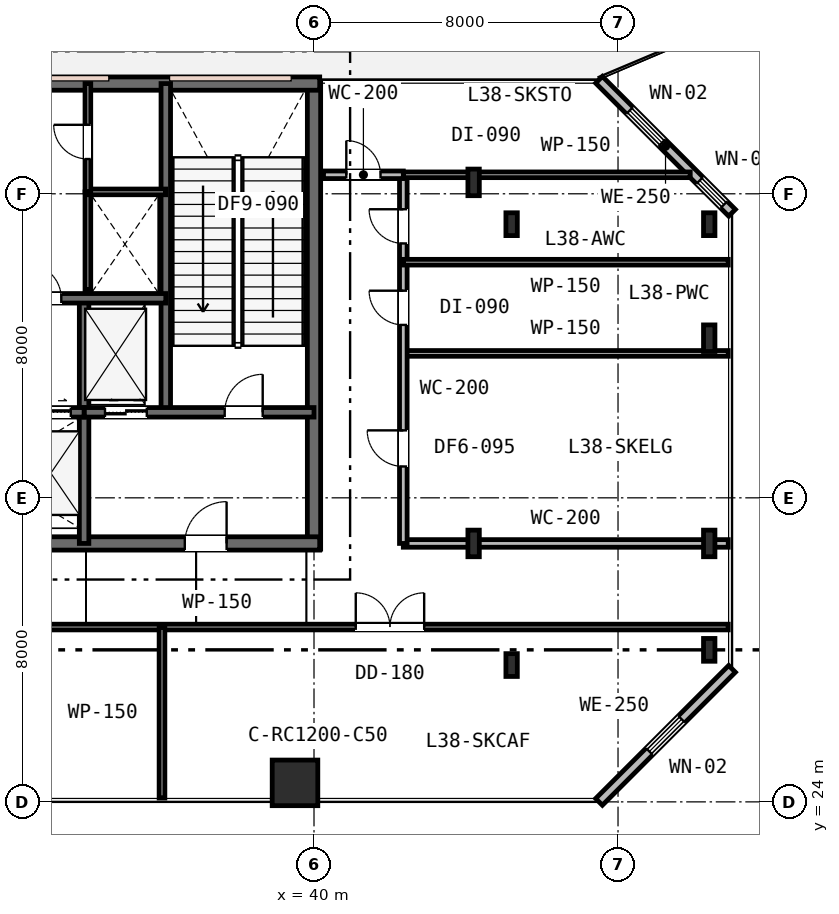
"""IFC4 building model, lengths in metres.
Left out: names, types, materials, properties, quantities, classifications, styles, units other than length and angle.
Written with IfcOpenShell. Run it as: python <this file> out.ifc"""

import sys

from ifc_helpers import new_model, si_unit, direction, frame, frame_2d, origin, origin_2d, place, context, subcontext, project, spatial, rectangle, i_section, extrude, element, fill, save


model = new_model("IFC4")
c1 = context("Model", 3, precision=1e-05, world=origin(), true_north=direction((0.0, 1.0)))
c2 = subcontext(c1, "Body", "Model", "MODEL_VIEW")
j1 = project(units=[si_unit("LENGTHUNIT", "METRE"), si_unit("PLANEANGLEUNIT", "RADIAN")], contexts=[c1])
p1 = place(None, origin())
s1 = spatial("IfcSite", under=j1, at=p1, CompositionType="ELEMENT")
p2 = place(p1, origin())
s2 = spatial("IfcBuilding", under=s1, at=p2, CompositionType="ELEMENT")
p3 = place(p2, frame((0.0, 0.0, 148.8)))
s3 = spatial("IfcBuildingStorey", under=s2, at=p3, CompositionType="ELEMENT", Elevation=148.8)
p4 = place(p3, frame((40.0, 30.65, 0.0), z_axis=(0.0, 0.0, 1.0), x_axis=(0.0, 1.0, 0.0)))
e1 = element("IfcWall", 1, at=p4, inside=s3, PredefinedType="SHEAR", context=c2, shape_type="SweptSolid", body=[
    extrude(rectangle(XDim=12.3, YDim=0.35, at=frame_2d((6.15, 0.0))), origin(), (0.0, 0.0, 1.0), 5.4),
])
p5 = place(p3, frame((15.85, 42.9, 0.0), z_axis=(0.0, 0.0, 1.0), x_axis=(1.0, 0.0, 0.0)))
e2 = element("IfcWall", 2, at=p5, inside=s3, PredefinedType="SHEAR", context=c2, shape_type="SweptSolid", body=[
    extrude(rectangle(XDim=24.3, YDim=0.35, at=frame_2d((12.15, 0.0))), origin(), (0.0, 0.0, 1.0), 5.4),
])
p6 = place(p3, frame((28.95, 30.8, 0.0), z_axis=(0.0, 0.0, 1.0), x_axis=(1.0, 0.0, 0.0)))
e3 = element("IfcWall", 3, at=p6, inside=s3, PredefinedType="SHEAR", context=c2, shape_type="SweptSolid", body=[
    extrude(rectangle(XDim=11.2, YDim=0.35, at=frame_2d((5.6, 0.0))), origin(), (0.0, 0.0, 1.0), 5.4),
])
p7 = place(p6, frame((7.65, 0.0, 0.0)))
e4 = element("IfcOpeningElement", 4, at=p7, cuts=e3, PredefinedType="OPENING", context=c2, shape_type="SweptSolid", body=[
    extrude(rectangle(XDim=1.1, YDim=2.15, at=frame_2d((0.55, 1.075))), frame((0.0, 0.185, 0.0), z_axis=(0.0, -1.0, 0.0), x_axis=(1.0, 0.0, 0.0)), (0.0, 0.0, 1.0), 0.37),
])
p8 = place(p3, frame((36.1, 34.25, 0.0), z_axis=(0.0, 0.0, 1.0), x_axis=(0.0, 1.0, 0.0)))
e5 = element("IfcWall", 5, at=p8, inside=s3, PredefinedType="SHEAR", context=c2, shape_type="SweptSolid", body=[
    extrude(rectangle(XDim=8.65, YDim=0.25, at=frame_2d((4.325, 0.0))), origin(), (0.0, 0.0, 1.0), 5.4),
])
p9 = place(p3, frame((33.95, 30.8, 0.0), z_axis=(0.0, 0.0, 1.0), x_axis=(0.0, 1.0, 0.0)))
e6 = element("IfcWall", 6, at=p9, inside=s3, PredefinedType="SHEAR", context=c2, shape_type="SweptSolid", body=[
    extrude(rectangle(XDim=6.45, YDim=0.25, at=frame_2d((3.225, 0.0))), origin(), (0.0, 0.0, 1.0), 5.4),
])
p10 = place(p3, frame((33.95, 34.25, 0.0), z_axis=(0.0, 0.0, 1.0), x_axis=(1.0, 0.0, 0.0)))
e7 = element("IfcWall", 7, at=p10, inside=s3, PredefinedType="SHEAR", context=c2, shape_type="SweptSolid", body=[
    extrude(rectangle(XDim=6.05, YDim=0.25, at=frame_2d((3.025, 0.0))), origin(), (0.0, 0.0, 1.0), 5.4),
])
p11 = place(p10, frame((3.7, 0.0, 0.0)))
e8 = element("IfcOpeningElement", 8, at=p11, cuts=e7, PredefinedType="OPENING", context=c2, shape_type="SweptSolid", body=[
    extrude(rectangle(XDim=1.0, YDim=2.15, at=frame_2d((0.5, 1.075))), frame((0.0, 0.135, 0.0), z_axis=(0.0, -1.0, 0.0), x_axis=(1.0, 0.0, 0.0)), (0.0, 0.0, 1.0), 0.27),
])
p12 = place(p10, frame((0.55, 0.0, 0.0)))
e9 = element("IfcOpeningElement", 9, at=p12, cuts=e7, PredefinedType="OPENING", context=c2, shape_type="SweptSolid", body=[
    extrude(rectangle(XDim=1.1, YDim=2.15, at=frame_2d((0.55, 1.075))), frame((0.0, 0.135, 0.0), z_axis=(0.0, -1.0, 0.0), x_axis=(1.0, 0.0, 0.0)), (0.0, 0.0, 1.0), 0.27),
])
p13 = place(p3, frame((28.95, 34.25, 0.0), z_axis=(0.0, 0.0, 1.0), x_axis=(1.0, 0.0, 0.0)))
e10 = element("IfcWall", 10, at=p13, inside=s3, PredefinedType="SHEAR", context=c2, shape_type="SweptSolid", body=[
    extrude(rectangle(XDim=5.0, YDim=0.25, at=frame_2d((2.5, 0.0))), origin(), (0.0, 0.0, 1.0), 5.4),
])
p14 = place(p13, frame((0.3, 0.0, 0.0)))
e11 = element("IfcOpeningElement", 11, at=p14, cuts=e10, PredefinedType="OPENING", context=c2, shape_type="SweptSolid", body=[
    extrude(rectangle(XDim=1.05, YDim=2.15, at=frame_2d((0.525, 1.075))), frame((0.0, 0.135, 0.0), z_axis=(0.0, -1.0, 0.0), x_axis=(1.0, 0.0, 0.0)), (0.0, 0.0, 1.0), 0.27),
])
p15 = place(p13, frame((1.95, 0.0, 0.0)))
e12 = element("IfcOpeningElement", 12, at=p15, cuts=e10, PredefinedType="OPENING", context=c2, shape_type="SweptSolid", body=[
    extrude(rectangle(XDim=1.05, YDim=2.15, at=frame_2d((0.525, 1.075))), frame((0.0, 0.135, 0.0), z_axis=(0.0, -1.0, 0.0), x_axis=(1.0, 0.0, 0.0)), (0.0, 0.0, 1.0), 0.27),
])
p16 = place(p13, frame((3.6, 0.0, 0.0)))
e13 = element("IfcOpeningElement", 13, at=p16, cuts=e10, PredefinedType="OPENING", context=c2, shape_type="SweptSolid", body=[
    extrude(rectangle(XDim=1.05, YDim=2.15, at=frame_2d((0.525, 1.075))), frame((0.0, 0.135, 0.0), z_axis=(0.0, -1.0, 0.0), x_axis=(1.0, 0.0, 0.0)), (0.0, 0.0, 1.0), 0.27),
])
p17 = place(p3, frame((19.9, 37.25, 0.0), z_axis=(0.0, 0.0, 1.0), x_axis=(1.0, 0.0, 0.0)))
e14 = element("IfcWall", 14, at=p17, inside=s3, PredefinedType="SHEAR", context=c2, shape_type="SweptSolid", body=[
    extrude(rectangle(XDim=16.2, YDim=0.25, at=frame_2d((8.1, 0.0))), origin(), (0.0, 0.0, 1.0), 5.4),
])
p18 = place(p17, frame((12.55, 0.0, 0.0)))
e15 = element("IfcOpeningElement", 15, at=p18, cuts=e14, PredefinedType="OPENING", context=c2, shape_type="SweptSolid", body=[
    extrude(rectangle(XDim=0.9, YDim=2.15, at=frame_2d((0.45, 1.075))), frame((0.0, 0.135, 0.0), z_axis=(0.0, -1.0, 0.0), x_axis=(1.0, 0.0, 0.0)), (0.0, 0.0, 1.0), 0.27),
])
p19 = place(p17, frame((2.5, 0.0, 0.0)))
e16 = element("IfcOpeningElement", 16, at=p19, cuts=e14, PredefinedType="OPENING", context=c2, shape_type="SweptSolid", body=[
    extrude(rectangle(XDim=1.05, YDim=2.15, at=frame_2d((0.525, 1.075))), frame((0.0, 0.135, 0.0), z_axis=(0.0, -1.0, 0.0), x_axis=(1.0, 0.0, 0.0)), (0.0, 0.0, 1.0), 0.27),
])
p20 = place(p17, frame((4.4, 0.0, 0.0)))
e17 = element("IfcOpeningElement", 17, at=p20, cuts=e14, PredefinedType="OPENING", context=c2, shape_type="SweptSolid", body=[
    extrude(rectangle(XDim=1.05, YDim=2.15, at=frame_2d((0.525, 1.075))), frame((0.0, 0.135, 0.0), z_axis=(0.0, -1.0, 0.0), x_axis=(1.0, 0.0, 0.0)), (0.0, 0.0, 1.0), 0.27),
])
p21 = place(p17, frame((6.3, 0.0, 0.0)))
e18 = element("IfcOpeningElement", 18, at=p21, cuts=e14, PredefinedType="OPENING", context=c2, shape_type="SweptSolid", body=[
    extrude(rectangle(XDim=1.05, YDim=2.15, at=frame_2d((0.525, 1.075))), frame((0.0, 0.135, 0.0), z_axis=(0.0, -1.0, 0.0), x_axis=(1.0, 0.0, 0.0)), (0.0, 0.0, 1.0), 0.27),
])
p22 = place(p3, frame((39.5, 24.5, 0.0), z_axis=(0.0, 0.0, 1.0), x_axis=(1.0, 0.0, 0.0)))
e19 = element("IfcColumn", 19, at=p22, inside=s3, PredefinedType="COLUMN", context=c2, shape_type="SweptSolid", body=[
    extrude(rectangle(XDim=1.2, YDim=1.2, at=origin_2d()), origin(), (0.0, 0.0, 1.0), 5.4),
])
for number, where, z_axis, x_axis in (
    (20, (45.2, 27.6, 0.0), (0.0, 0.0, 1.0), (1.0, 0.0, 0.0)),
    (21, (45.2, 39.2, 0.0), (0.0, 0.0, 1.0), (1.0, 0.0, 0.0)),
    (22, (50.4, 28.0, 0.0), (0.0, 0.0, 1.0), (1.0, 0.0, 0.0)),
    (23, (50.4, 39.2, 0.0), (0.0, 0.0, 1.0), (1.0, 0.0, 0.0)),
):
    element("IfcColumn", number, at=place(p3, frame(where, z_axis=z_axis, x_axis=x_axis)), inside=s3, PredefinedType="COLUMN", context=c2, shape_type="SweptSolid", body=[
        extrude(i_section(OverallWidth=0.3, OverallDepth=0.6, WebThickness=0.015, FlangeThickness=0.03, FilletRadius=0.027, at=origin_2d()), origin(), (0.0, 0.0, 1.0), 5.4),
    ])
for number, where, z_axis, x_axis in (
    (24, (44.2, 30.8, 0.0), (0.0, 0.0, 1.0), (1.0, 0.0, 0.0)),
    (25, (44.2, 40.3, 0.0), (0.0, 0.0, 1.0), (1.0, 0.0, 0.0)),
    (26, (50.4, 30.8, 0.0), (0.0, 0.0, 1.0), (1.0, 0.0, 0.0)),
    (27, (50.4, 36.2, 0.0), (0.0, 0.0, 1.0), (1.0, 0.0, 0.0)),
):
    element("IfcColumn", number, at=place(p3, frame(where, z_axis=z_axis, x_axis=x_axis)), inside=s3, PredefinedType="COLUMN", context=c2, shape_type="SweptSolid", body=[
        extrude(i_section(OverallWidth=0.3, OverallDepth=0.7, WebThickness=0.017, FlangeThickness=0.032, FilletRadius=0.027, at=origin_2d()), origin(), (0.0, 0.0, 1.0), 5.4),
    ])
p23 = place(p3, frame((47.5, 24.0, 0.0), z_axis=(0.0, 0.0, 1.0), x_axis=(0.707106781187, 0.707106781187, 0.0)))
e28 = element("IfcWall", 28, at=p23, inside=s3, PredefinedType="STANDARD", context=c2, shape_type="SweptSolid", body=[
    extrude(rectangle(XDim=4.95, YDim=0.25, at=frame_2d((2.475, 0.0))), origin(), (0.0, 0.0, 1.0), 5.13),
])
p24 = place(p23, frame((1.875, 0.0, 0.85)))
e29 = element("IfcOpeningElement", 29, at=p24, cuts=e28, PredefinedType="OPENING", context=c2, shape_type="SweptSolid", body=[
    extrude(rectangle(XDim=1.2, YDim=1.6, at=frame_2d((0.6, 0.8))), frame((0.0, 0.135, 0.0), z_axis=(0.0, -1.0, 0.0), x_axis=(1.0, 0.0, 0.0)), (0.0, 0.0, 1.0), 0.27),
])
p25 = place(p3, frame((51.0, 39.5, 0.0), z_axis=(0.0, 0.0, 1.0), x_axis=(-0.707106781187, 0.707106781187, 0.0)))
e30 = element("IfcWall", 30, at=p25, inside=s3, PredefinedType="STANDARD", context=c2, shape_type="SweptSolid", body=[
    extrude(rectangle(XDim=4.95, YDim=0.25, at=frame_2d((2.475, 0.0))), origin(), (0.0, 0.0, 1.0), 5.13),
])
p26 = place(p25, frame((0.302, 0.0, 0.9)))
e31 = element("IfcOpeningElement", 31, at=p26, cuts=e30, PredefinedType="OPENING", context=c2, shape_type="SweptSolid", body=[
    extrude(rectangle(XDim=0.9, YDim=1.55, at=frame_2d((0.45, 0.775))), frame((0.0, 0.135, 0.0), z_axis=(0.0, -1.0, 0.0), x_axis=(1.0, 0.0, 0.0)), (0.0, 0.0, 1.0), 0.27),
])
p27 = place(p25, frame((2.607, 0.0, 0.85)))
e32 = element("IfcOpeningElement", 32, at=p27, cuts=e30, PredefinedType="OPENING", context=c2, shape_type="SweptSolid", body=[
    extrude(rectangle(XDim=1.2, YDim=1.6, at=frame_2d((0.6, 0.8))), frame((0.0, 0.135, 0.0), z_axis=(0.0, -1.0, 0.0), x_axis=(1.0, 0.0, 0.0)), (0.0, 0.0, 1.0), 0.27),
])
p28 = place(p3, frame((34.05, 37.473, 0.0), z_axis=(0.0, 0.0, 1.0), x_axis=(0.0, 1.0, 0.0)))
e33 = element("IfcWall", 33, at=p28, inside=s3, PredefinedType="PLUMBINGWALL", context=c2, shape_type="SweptSolid", body=[
    extrude(rectangle(XDim=2.577, YDim=0.15, at=frame_2d((1.288, 0.0))), origin(), (0.0, 0.0, 1.0), 5.13),
])
p29 = place(p3, frame((34.05, 40.05, 0.0), z_axis=(0.0, 0.0, 1.0), x_axis=(1.0, 0.0, 0.0)))
e34 = element("IfcWall", 34, at=p29, inside=s3, PredefinedType="PARTITIONING", context=c2, shape_type="SweptSolid", body=[
    extrude(rectangle(XDim=2.05, YDim=0.15, at=frame_2d((1.025, 0.0))), origin(), (0.0, 0.0, 1.0), 5.13),
])
p30 = place(p3, frame((34.05, 40.05, 0.0), z_axis=(0.0, 0.0, 1.0), x_axis=(0.0, 1.0, 0.0)))
e35 = element("IfcWall", 35, at=p30, inside=s3, PredefinedType="PARTITIONING", context=c2, shape_type="SweptSolid", body=[
    extrude(rectangle(XDim=2.85, YDim=0.15, at=frame_2d((1.425, 0.0))), origin(), (0.0, 0.0, 1.0), 5.13),
])
p31 = place(p30, frame((0.865, 0.0, 0.0)))
e36 = element("IfcOpeningElement", 36, at=p31, cuts=e35, PredefinedType="OPENING", context=c2, shape_type="SweptSolid", body=[
    extrude(rectangle(XDim=0.9, YDim=2.15, at=frame_2d((0.45, 1.075))), frame((0.0, 0.085, 0.0), z_axis=(0.0, -1.0, 0.0), x_axis=(1.0, 0.0, 0.0)), (0.0, 0.0, 1.0), 0.17),
])
p32 = place(p3, frame((42.35, 30.8, 0.0), z_axis=(0.0, 0.0, 1.0), x_axis=(1.0, 0.0, 0.0)))
e37 = element("IfcWall", 37, at=p32, inside=s3, PredefinedType="PARTITIONING", context=c2, shape_type="SweptSolid", body=[
    extrude(rectangle(XDim=8.55, YDim=0.2, at=frame_2d((4.275, 0.0))), origin(), (0.0, 0.0, 1.0), 4.73),
])
p33 = place(p3, frame((42.35, 35.8, 0.0), z_axis=(0.0, 0.0, 1.0), x_axis=(1.0, 0.0, 0.0)))
e38 = element("IfcWall", 38, at=p33, inside=s3, PredefinedType="PARTITIONING", context=c2, shape_type="SweptSolid", body=[
    extrude(rectangle(XDim=8.55, YDim=0.15, at=frame_2d((4.275, 0.0))), origin(), (0.0, 0.0, 1.0), 4.73),
])
p34 = place(p3, frame((42.35, 30.8, 0.0), z_axis=(0.0, 0.0, 1.0), x_axis=(0.0, 1.0, 0.0)))
e39 = element("IfcWall", 39, at=p34, inside=s3, PredefinedType="PARTITIONING", context=c2, shape_type="SweptSolid", body=[
    extrude(rectangle(XDim=9.7, YDim=0.2, at=frame_2d((4.85, 0.0))), origin(), (0.0, 0.0, 1.0), 4.73),
])
p35 = place(p34, frame((2.025, 0.0, 0.0)))
e40 = element("IfcOpeningElement", 40, at=p35, cuts=e39, PredefinedType="OPENING", context=c2, shape_type="SweptSolid", body=[
    extrude(rectangle(XDim=0.95, YDim=2.15, at=frame_2d((0.475, 1.075))), frame((0.0, 0.11, 0.0), z_axis=(0.0, -1.0, 0.0), x_axis=(1.0, 0.0, 0.0)), (0.0, 0.0, 1.0), 0.22),
])
p36 = place(p34, frame((5.75, 0.0, 0.0)))
e41 = element("IfcOpeningElement", 41, at=p36, cuts=e39, PredefinedType="OPENING", context=c2, shape_type="SweptSolid", body=[
    extrude(rectangle(XDim=0.9, YDim=2.15, at=frame_2d((0.45, 1.075))), frame((0.0, 0.11, 0.0), z_axis=(0.0, -1.0, 0.0), x_axis=(1.0, 0.0, 0.0)), (0.0, 0.0, 1.0), 0.22),
])
p37 = place(p34, frame((7.893, 0.0, 0.0)))
e42 = element("IfcOpeningElement", 42, at=p37, cuts=e39, PredefinedType="OPENING", context=c2, shape_type="SweptSolid", body=[
    extrude(rectangle(XDim=0.9, YDim=2.15, at=frame_2d((0.45, 1.075))), frame((0.0, 0.11, 0.0), z_axis=(0.0, -1.0, 0.0), x_axis=(1.0, 0.0, 0.0)), (0.0, 0.0, 1.0), 0.22),
])
p38 = place(p3, frame((42.35, 38.2, 0.0), z_axis=(0.0, 0.0, 1.0), x_axis=(1.0, 0.0, 0.0)))
e43 = element("IfcWall", 43, at=p38, inside=s3, PredefinedType="PARTITIONING", context=c2, shape_type="SweptSolid", body=[
    extrude(rectangle(XDim=8.55, YDim=0.15, at=frame_2d((4.275, 0.0))), origin(), (0.0, 0.0, 1.0), 4.73),
])
p39 = place(p3, frame((42.35, 40.5, 0.0), z_axis=(0.0, 0.0, 1.0), x_axis=(1.0, 0.0, 0.0)))
e44 = element("IfcWall", 44, at=p39, inside=s3, PredefinedType="PARTITIONING", context=c2, shape_type="SweptSolid", body=[
    extrude(rectangle(XDim=7.55, YDim=0.15, at=frame_2d((3.775, 0.0))), origin(), (0.0, 0.0, 1.0), 4.73),
])
p40 = place(p3, frame((40.25, 40.5, 0.0), z_axis=(0.0, 0.0, 1.0), x_axis=(1.0, 0.0, 0.0)))
e45 = element("IfcWall", 45, at=p40, inside=s3, PredefinedType="PARTITIONING", context=c2, shape_type="SweptSolid", body=[
    extrude(rectangle(XDim=2.1, YDim=0.2, at=frame_2d((1.05, 0.0))), origin(), (0.0, 0.0, 1.0), 5.13),
])
p41 = place(p40, frame((0.6, 0.0, 0.0)))
e46 = element("IfcOpeningElement", 46, at=p41, cuts=e45, PredefinedType="OPENING", context=c2, shape_type="SweptSolid", body=[
    extrude(rectangle(XDim=0.9, YDim=2.15, at=frame_2d((0.45, 1.075))), frame((0.0, 0.11, 0.0), z_axis=(0.0, -1.0, 0.0), x_axis=(1.0, 0.0, 0.0)), (0.0, 0.0, 1.0), 0.22),
])
p42 = place(p3, frame((24.0, 28.6, 0.0), z_axis=(0.0, 0.0, 1.0), x_axis=(1.0, 0.0, 0.0)))
e47 = element("IfcWall", 47, at=p42, inside=s3, PredefinedType="PARTITIONING", context=c2, shape_type="SweptSolid", body=[
    extrude(rectangle(XDim=26.9, YDim=0.15, at=frame_2d((13.45, 0.0))), origin(), (0.0, 0.0, 1.0), 4.73),
])
p43 = place(p42, frame((5.1, 0.0, 0.0)))
e48 = element("IfcOpeningElement", 48, at=p43, cuts=e47, PredefinedType="OPENING", context=c2, shape_type="SweptSolid", body=[
    extrude(rectangle(XDim=1.8, YDim=2.15, at=frame_2d((0.9, 1.075))), frame((0.0, 0.085, 0.0), z_axis=(0.0, -1.0, 0.0), x_axis=(1.0, 0.0, 0.0)), (0.0, 0.0, 1.0), 0.17),
])
p44 = place(p42, frame((17.099, 0.0, 0.0)))
e49 = element("IfcOpeningElement", 49, at=p44, cuts=e47, PredefinedType="OPENING", context=c2, shape_type="SweptSolid", body=[
    extrude(rectangle(XDim=1.8, YDim=2.15, at=frame_2d((0.9, 1.075))), frame((0.0, 0.085, 0.0), z_axis=(0.0, -1.0, 0.0), x_axis=(1.0, 0.0, 0.0)), (0.0, 0.0, 1.0), 0.17),
])
p45 = place(p3, frame((36.0, 24.1, 0.0), z_axis=(0.0, 0.0, 1.0), x_axis=(0.0, 1.0, 0.0)))
e50 = element("IfcWall", 50, at=p45, inside=s3, PredefinedType="PARTITIONING", context=c2, shape_type="SweptSolid", body=[
    extrude(rectangle(XDim=4.5, YDim=0.15, at=frame_2d((2.25, 0.0))), origin(), (0.0, 0.0, 1.0), 4.81),
])
p46 = place(p24, origin())
e51 = element("IfcWindow", 51, at=p46, inside=s3, PartitioningType="SINGLE_PANEL", PredefinedType="WINDOW", context=c2, shape_type="SweptSolid", body=[
    extrude(rectangle(XDim=1.2, YDim=1.6, at=frame_2d((0.6, 0.8))), frame((0.0, 0.03, 0.0), z_axis=(0.0, -1.0, 0.0), x_axis=(1.0, 0.0, 0.0)), (0.0, 0.0, 1.0), 0.06),
])
fill(e29, e51)
p47 = place(p26, origin())
e52 = element("IfcWindow", 52, at=p47, inside=s3, PartitioningType="SINGLE_PANEL", PredefinedType="WINDOW", context=c2, shape_type="SweptSolid", body=[
    extrude(rectangle(XDim=0.9, YDim=1.55, at=frame_2d((0.45, 0.775))), frame((0.0, 0.03, 0.0), z_axis=(0.0, -1.0, 0.0), x_axis=(1.0, 0.0, 0.0)), (0.0, 0.0, 1.0), 0.06),
])
fill(e31, e52)
p48 = place(p27, origin())
e53 = element("IfcWindow", 53, at=p48, inside=s3, PartitioningType="SINGLE_PANEL", PredefinedType="WINDOW", context=c2, shape_type="SweptSolid", body=[
    extrude(rectangle(XDim=1.2, YDim=1.6, at=frame_2d((0.6, 0.8))), frame((0.0, 0.03, 0.0), z_axis=(0.0, -1.0, 0.0), x_axis=(1.0, 0.0, 0.0)), (0.0, 0.0, 1.0), 0.06),
])
fill(e32, e53)
p49 = place(p11, origin())
e54 = element("IfcDoor", 54, at=p49, inside=s3, OperationType="SINGLE_SWING_RIGHT", PredefinedType="DOOR", context=c2, shape_type="SweptSolid", body=[
    extrude(rectangle(XDim=1.0, YDim=2.15, at=frame_2d((0.5, 1.075))), frame((0.0, 0.025, 0.0), z_axis=(0.0, -1.0, 0.0), x_axis=(1.0, 0.0, 0.0)), (0.0, 0.0, 1.0), 0.05),
])
fill(e8, e54)
p50 = place(p7, origin())
e55 = element("IfcDoor", 55, at=p50, inside=s3, OperationType="SINGLE_SWING_RIGHT", PredefinedType="DOOR", context=c2, shape_type="SweptSolid", body=[
    extrude(rectangle(XDim=1.1, YDim=2.15, at=frame_2d((0.55, 1.075))), frame((0.0, 0.025, 0.0), z_axis=(0.0, -1.0, 0.0), x_axis=(1.0, 0.0, 0.0)), (0.0, 0.0, 1.0), 0.05),
])
fill(e4, e55)
p51 = place(p18, origin())
e56 = element("IfcDoor", 56, at=p51, inside=s3, OperationType="SINGLE_SWING_LEFT", PredefinedType="DOOR", context=c2, shape_type="SweptSolid", body=[
    extrude(rectangle(XDim=0.9, YDim=2.15, at=frame_2d((0.45, 1.075))), frame((0.0, 0.025, 0.0), z_axis=(0.0, -1.0, 0.0), x_axis=(1.0, 0.0, 0.0)), (0.0, 0.0, 1.0), 0.05),
])
fill(e15, e56)
p52 = place(p31, origin())
e57 = element("IfcDoor", 57, at=p52, inside=s3, OperationType="SINGLE_SWING_RIGHT", PredefinedType="DOOR", context=c2, shape_type="SweptSolid", body=[
    extrude(rectangle(XDim=0.9, YDim=2.15, at=frame_2d((0.45, 1.075))), frame((0.0, 0.025, 0.0), z_axis=(0.0, -1.0, 0.0), x_axis=(1.0, 0.0, 0.0)), (0.0, 0.0, 1.0), 0.05),
])
fill(e36, e57)
p53 = place(p35, origin())
e58 = element("IfcDoor", 58, at=p53, inside=s3, OperationType="SINGLE_SWING_RIGHT", PredefinedType="DOOR", context=c2, shape_type="SweptSolid", body=[
    extrude(rectangle(XDim=0.95, YDim=2.15, at=frame_2d((0.475, 1.075))), frame((0.0, 0.025, 0.0), z_axis=(0.0, -1.0, 0.0), x_axis=(1.0, 0.0, 0.0)), (0.0, 0.0, 1.0), 0.05),
])
fill(e40, e58)
p54 = place(p36, origin())
e59 = element("IfcDoor", 59, at=p54, inside=s3, OperationType="SINGLE_SWING_RIGHT", PredefinedType="DOOR", context=c2, shape_type="SweptSolid", body=[
    extrude(rectangle(XDim=0.9, YDim=2.15, at=frame_2d((0.45, 1.075))), frame((0.0, 0.025, 0.0), z_axis=(0.0, -1.0, 0.0), x_axis=(1.0, 0.0, 0.0)), (0.0, 0.0, 1.0), 0.05),
])
fill(e41, e59)
p55 = place(p37, origin())
e60 = element("IfcDoor", 60, at=p55, inside=s3, OperationType="SINGLE_SWING_RIGHT", PredefinedType="DOOR", context=c2, shape_type="SweptSolid", body=[
    extrude(rectangle(XDim=0.9, YDim=2.15, at=frame_2d((0.45, 1.075))), frame((0.0, 0.025, 0.0), z_axis=(0.0, -1.0, 0.0), x_axis=(1.0, 0.0, 0.0)), (0.0, 0.0, 1.0), 0.05),
])
fill(e42, e60)
p56 = place(p41, origin())
e61 = element("IfcDoor", 61, at=p56, inside=s3, OperationType="SINGLE_SWING_LEFT", PredefinedType="DOOR", context=c2, shape_type="SweptSolid", body=[
    extrude(rectangle(XDim=0.9, YDim=2.15, at=frame_2d((0.45, 1.075))), frame((0.0, 0.025, 0.0), z_axis=(0.0, -1.0, 0.0), x_axis=(1.0, 0.0, 0.0)), (0.0, 0.0, 1.0), 0.05),
])
fill(e46, e61)
p57 = place(p44, origin())
e62 = element("IfcDoor", 62, at=p57, inside=s3, OperationType="DOUBLE_DOOR_SINGLE_SWING", PredefinedType="DOOR", context=c2, shape_type="SweptSolid", body=[
    extrude(rectangle(XDim=1.8, YDim=2.15, at=frame_2d((0.9, 1.075))), frame((0.0, 0.025, 0.0), z_axis=(0.0, -1.0, 0.0), x_axis=(1.0, 0.0, 0.0)), (0.0, 0.0, 1.0), 0.05),
])
fill(e49, e62)
p58 = place(p12, origin())
e63 = element("IfcDoor", 63, at=p58, inside=s3, OperationType="DOUBLE_DOOR_SLIDING", PredefinedType="DOOR", context=c2, shape_type="SweptSolid", body=[
    extrude(rectangle(XDim=1.1, YDim=2.15, at=frame_2d((0.55, 1.075))), frame((0.0, 0.025, 0.0), z_axis=(0.0, -1.0, 0.0), x_axis=(1.0, 0.0, 0.0)), (0.0, 0.0, 1.0), 0.05),
])
fill(e9, e63)
p59 = place(p16, origin())
e64 = element("IfcDoor", 64, at=p59, inside=s3, OperationType="DOUBLE_DOOR_SLIDING", PredefinedType="DOOR", context=c2, shape_type="SweptSolid", body=[
    extrude(rectangle(XDim=1.05, YDim=2.15, at=frame_2d((0.525, 1.075))), frame((0.0, 0.025, 0.0), z_axis=(0.0, -1.0, 0.0), x_axis=(1.0, 0.0, 0.0)), (0.0, 0.0, 1.0), 0.05),
])
fill(e13, e64)
save(model, sys.argv[1])
